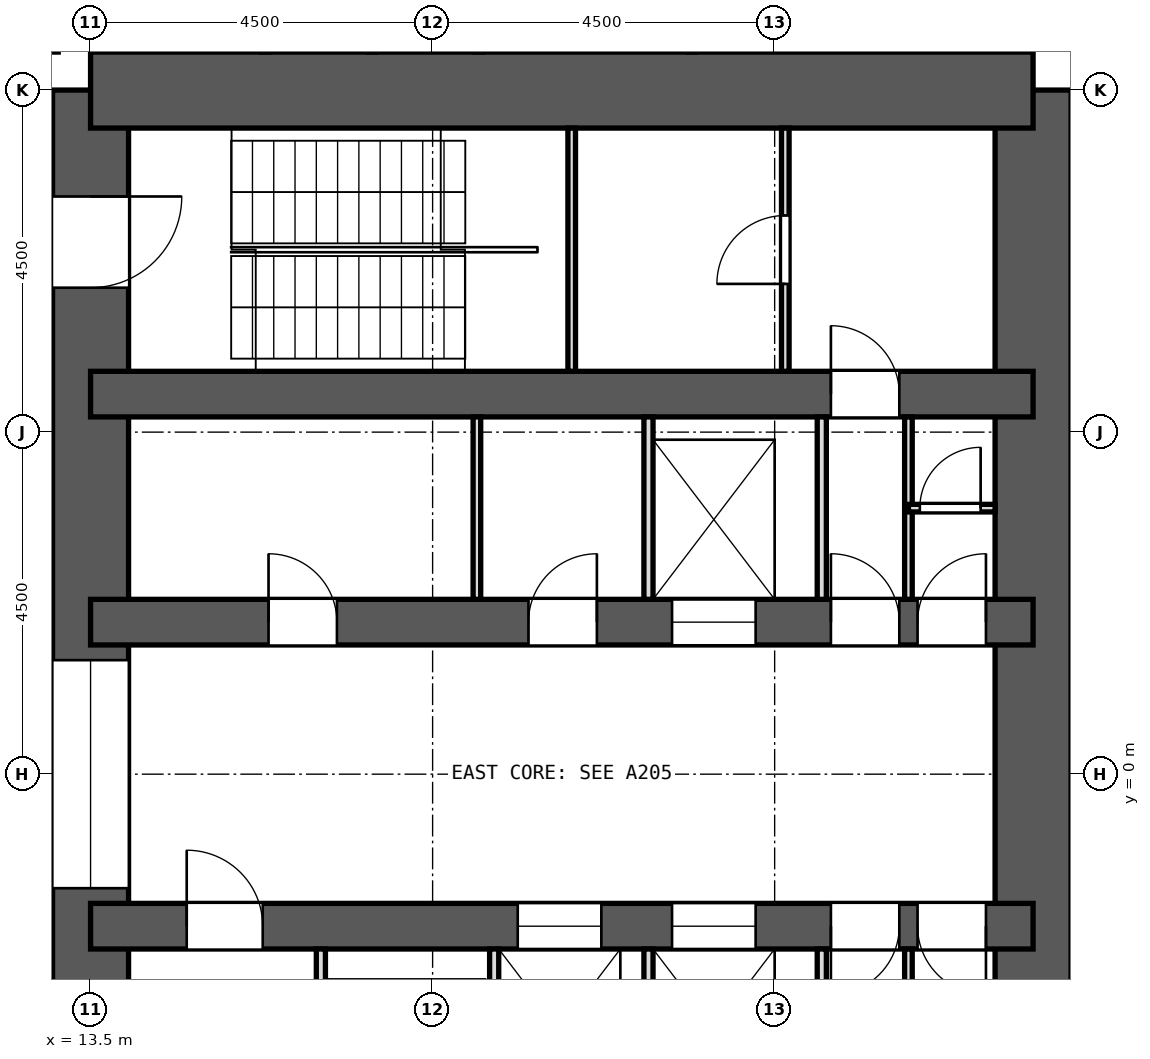
"""IFC4 building model, lengths in metres.
Left out: names, types, materials, properties, quantities, classifications, styles, units other than length and angle.
Written with IfcOpenShell. Run it as: python <this file> out.ifc"""

import sys

from ifc_helpers import new_model, si_unit, direction, frame, frame_2d, origin, place, context, subcontext, project, spatial, rectangle, extrude, element, fill, save


model = new_model("IFC4")
c1 = context("Model", 3, precision=1e-05, world=origin(), true_north=direction((0.0, 1.0)))
c2 = subcontext(c1, "Body", "Model", "MODEL_VIEW")
j1 = project(units=[si_unit("LENGTHUNIT", "METRE"), si_unit("PLANEANGLEUNIT", "RADIAN")], contexts=[c1])
p1 = place(None, origin())
s1 = spatial("IfcSite", under=j1, at=p1, CompositionType="ELEMENT")
p2 = place(p1, origin())
s2 = spatial("IfcBuilding", under=s1, at=p2, CompositionType="ELEMENT")
p3 = place(p2, frame((0.0, 0.0, 9.2)))
s3 = spatial("IfcBuildingStorey", under=s2, at=p3, CompositionType="ELEMENT", Elevation=9.2)
p4 = place(p3, frame((13.5, -9.0, 0.0), z_axis=(0.0, 0.0, 1.0), x_axis=(0.0, 1.0, 0.0)))
e1 = element("IfcWall", 1, at=p4, inside=s3, PredefinedType="SHEAR", context=c2, shape_type="SweptSolid", body=[
    extrude(rectangle(XDim=18.0, YDim=1.0, at=frame_2d((9.0, 0.0))), origin(), (0.0, 0.0, 1.0), 4.2),
])
p5 = place(p4, frame((15.4, 0.0, 0.0)))
e2 = element("IfcOpeningElement", 2, at=p5, cuts=e1, PredefinedType="OPENING", context=c2, shape_type="SweptSolid", body=[
    extrude(rectangle(XDim=1.2, YDim=2.1, at=frame_2d((0.6, 1.05))), frame((0.0, 0.512, 0.0), z_axis=(0.0, -1.0, 0.0), x_axis=(1.0, 0.0, 0.0)), (0.0, 0.0, 1.0), 1.024),
])
p6 = place(p4, frame((1.4, 0.0, 0.0)))
e3 = element("IfcOpeningElement", 3, at=p6, cuts=e1, PredefinedType="OPENING", context=c2, shape_type="SweptSolid", body=[
    extrude(rectangle(XDim=1.2, YDim=2.1, at=frame_2d((0.6, 1.05))), frame((0.0, 0.512, 0.0), z_axis=(0.0, -1.0, 0.0), x_axis=(1.0, 0.0, 0.0)), (0.0, 0.0, 1.0), 1.024),
])
p7 = place(p4, frame((7.5, 0.0, 0.0)))
e4 = element("IfcOpeningElement", 4, at=p7, cuts=e1, PredefinedType="OPENING", context=c2, shape_type="SweptSolid", body=[
    extrude(rectangle(XDim=3.0, YDim=2.4, at=frame_2d((1.5, 1.2))), frame((0.0, 0.512, 0.0), z_axis=(0.0, -1.0, 0.0), x_axis=(1.0, 0.0, 0.0)), (0.0, 0.0, 1.0), 1.024),
])
p8 = place(p3, frame((25.9, -9.0, 0.0), z_axis=(0.0, 0.0, 1.0), x_axis=(0.0, 1.0, 0.0)))
e5 = element("IfcWall", 5, at=p8, inside=s3, PredefinedType="SHEAR", context=c2, shape_type="SweptSolid", body=[
    extrude(rectangle(XDim=18.0, YDim=1.0, at=frame_2d((9.0, 0.0))), origin(), (0.0, 0.0, 1.0), 4.2),
])
p9 = place(p3, frame((13.5, 9.0, 0.0), z_axis=(0.0, 0.0, 1.0), x_axis=(1.0, 0.0, 0.0)))
e6 = element("IfcWall", 6, at=p9, inside=s3, PredefinedType="SHEAR", context=c2, shape_type="SweptSolid", body=[
    extrude(rectangle(XDim=12.4, YDim=1.0, at=frame_2d((6.2, 0.0))), origin(), (0.0, 0.0, 1.0), 4.2),
])
p10 = place(p3, frame((13.5, 5.0, 0.0), z_axis=(0.0, 0.0, 1.0), x_axis=(1.0, 0.0, 0.0)))
e7 = element("IfcWall", 7, at=p10, inside=s3, PredefinedType="SHEAR", context=c2, shape_type="SweptSolid", body=[
    extrude(rectangle(XDim=12.4, YDim=0.6, at=frame_2d((6.2, 0.0))), origin(), (0.0, 0.0, 1.0), 4.2),
])
p11 = place(p10, frame((9.74, 0.0, 0.0)))
e8 = element("IfcOpeningElement", 8, at=p11, cuts=e7, PredefinedType="OPENING", context=c2, shape_type="SweptSolid", body=[
    extrude(rectangle(XDim=0.9, YDim=2.1, at=frame_2d((0.45, 1.05))), frame((0.0, 0.312, 0.0), z_axis=(0.0, -1.0, 0.0), x_axis=(1.0, 0.0, 0.0)), (0.0, 0.0, 1.0), 0.624),
])
p12 = place(p3, frame((13.5, 2.0, 0.0), z_axis=(0.0, 0.0, 1.0), x_axis=(1.0, 0.0, 0.0)))
e9 = element("IfcWall", 9, at=p12, inside=s3, PredefinedType="SHEAR", context=c2, shape_type="SweptSolid", body=[
    extrude(rectangle(XDim=12.4, YDim=0.6, at=frame_2d((6.2, 0.0))), origin(), (0.0, 0.0, 1.0), 4.2),
])
p13 = place(p12, frame((7.65, 0.0, 0.0)))
e10 = element("IfcOpeningElement", 10, at=p13, cuts=e9, PredefinedType="OPENING", context=c2, shape_type="SweptSolid", body=[
    extrude(rectangle(XDim=1.1, YDim=2.1, at=frame_2d((0.55, 1.05))), frame((0.0, 0.312, 0.0), z_axis=(0.0, -1.0, 0.0), x_axis=(1.0, 0.0, 0.0)), (0.0, 0.0, 1.0), 0.624),
])
p14 = place(p12, frame((2.341, 0.0, 0.0)))
e11 = element("IfcOpeningElement", 11, at=p14, cuts=e9, PredefinedType="OPENING", context=c2, shape_type="SweptSolid", body=[
    extrude(rectangle(XDim=0.9, YDim=2.1, at=frame_2d((0.45, 1.05))), frame((0.0, 0.312, 0.0), z_axis=(0.0, -1.0, 0.0), x_axis=(1.0, 0.0, 0.0)), (0.0, 0.0, 1.0), 0.624),
])
p15 = place(p12, frame((5.761, 0.0, 0.0)))
e12 = element("IfcOpeningElement", 12, at=p15, cuts=e9, PredefinedType="OPENING", context=c2, shape_type="SweptSolid", body=[
    extrude(rectangle(XDim=0.9, YDim=2.1, at=frame_2d((0.45, 1.05))), frame((0.0, 0.312, 0.0), z_axis=(0.0, -1.0, 0.0), x_axis=(1.0, 0.0, 0.0)), (0.0, 0.0, 1.0), 0.624),
])
p16 = place(p12, frame((9.74, 0.0, 0.0)))
e13 = element("IfcOpeningElement", 13, at=p16, cuts=e9, PredefinedType="OPENING", context=c2, shape_type="SweptSolid", body=[
    extrude(rectangle(XDim=0.9, YDim=2.1, at=frame_2d((0.45, 1.05))), frame((0.0, 0.312, 0.0), z_axis=(0.0, -1.0, 0.0), x_axis=(1.0, 0.0, 0.0)), (0.0, 0.0, 1.0), 0.624),
])
p17 = place(p12, frame((10.88, 0.0, 0.0)))
e14 = element("IfcOpeningElement", 14, at=p17, cuts=e9, PredefinedType="OPENING", context=c2, shape_type="SweptSolid", body=[
    extrude(rectangle(XDim=0.9, YDim=2.1, at=frame_2d((0.45, 1.05))), frame((0.0, 0.312, 0.0), z_axis=(0.0, -1.0, 0.0), x_axis=(1.0, 0.0, 0.0)), (0.0, 0.0, 1.0), 0.624),
])
p18 = place(p3, frame((13.5, -2.0, 0.0), z_axis=(0.0, 0.0, 1.0), x_axis=(1.0, 0.0, 0.0)))
e15 = element("IfcWall", 15, at=p18, inside=s3, PredefinedType="SHEAR", context=c2, shape_type="SweptSolid", body=[
    extrude(rectangle(XDim=12.4, YDim=0.6, at=frame_2d((6.2, 0.0))), origin(), (0.0, 0.0, 1.0), 4.2),
])
p19 = place(p18, frame((5.62, 0.0, 0.0)))
e16 = element("IfcOpeningElement", 16, at=p19, cuts=e15, PredefinedType="OPENING", context=c2, shape_type="SweptSolid", body=[
    extrude(rectangle(XDim=1.1, YDim=2.1, at=frame_2d((0.55, 1.05))), frame((0.0, 0.312, 0.0), z_axis=(0.0, -1.0, 0.0), x_axis=(1.0, 0.0, 0.0)), (0.0, 0.0, 1.0), 0.624),
])
p20 = place(p18, frame((7.65, 0.0, 0.0)))
e17 = element("IfcOpeningElement", 17, at=p20, cuts=e15, PredefinedType="OPENING", context=c2, shape_type="SweptSolid", body=[
    extrude(rectangle(XDim=1.1, YDim=2.1, at=frame_2d((0.55, 1.05))), frame((0.0, 0.312, 0.0), z_axis=(0.0, -1.0, 0.0), x_axis=(1.0, 0.0, 0.0)), (0.0, 0.0, 1.0), 0.624),
])
p21 = place(p18, frame((1.265, 0.0, 0.0)))
e18 = element("IfcOpeningElement", 18, at=p21, cuts=e15, PredefinedType="OPENING", context=c2, shape_type="SweptSolid", body=[
    extrude(rectangle(XDim=1.0, YDim=2.1, at=frame_2d((0.5, 1.05))), frame((0.0, 0.312, 0.0), z_axis=(0.0, -1.0, 0.0), x_axis=(1.0, 0.0, 0.0)), (0.0, 0.0, 1.0), 0.624),
])
p22 = place(p18, frame((9.74, 0.0, 0.0)))
e19 = element("IfcOpeningElement", 19, at=p22, cuts=e15, PredefinedType="OPENING", context=c2, shape_type="SweptSolid", body=[
    extrude(rectangle(XDim=0.9, YDim=2.1, at=frame_2d((0.45, 1.05))), frame((0.0, 0.312, 0.0), z_axis=(0.0, -1.0, 0.0), x_axis=(1.0, 0.0, 0.0)), (0.0, 0.0, 1.0), 0.624),
])
p23 = place(p18, frame((10.88, 0.0, 0.0)))
e20 = element("IfcOpeningElement", 20, at=p23, cuts=e15, PredefinedType="OPENING", context=c2, shape_type="SweptSolid", body=[
    extrude(rectangle(XDim=0.9, YDim=2.1, at=frame_2d((0.45, 1.05))), frame((0.0, 0.312, 0.0), z_axis=(0.0, -1.0, 0.0), x_axis=(1.0, 0.0, 0.0)), (0.0, 0.0, 1.0), 0.624),
])
p24 = place(p3, frame((27.73, 7.403, 0.0), z_axis=(0.0, 0.0, 1.0), x_axis=(-0.342034744565, 0.939687306241, 0.0)))
e21 = element("IfcWall", 21, at=p24, inside=s3, PredefinedType="SOLIDWALL", context=c2, shape_type="SweptSolid", body=[
    extrude(rectangle(XDim=4.099, YDim=0.6, at=frame_2d((2.05, 0.0))), origin(), (0.0, 0.0, 1.0), 3.65),
])
p25 = place(p3, frame((18.583, 2.3, 0.0), z_axis=(0.0, 0.0, 1.0), x_axis=(0.0, 1.0, 0.0)))
e22 = element("IfcWall", 22, at=p25, inside=s3, PredefinedType="PARTITIONING", context=c2, shape_type="SweptSolid", body=[
    extrude(rectangle(XDim=2.4, YDim=0.1, at=frame_2d((1.2, 0.0))), origin(), (0.0, 0.0, 1.0), 3.65),
])
for number, where, z_axis, x_axis in (
    (23, (20.84, 2.3, 0.0), (0.0, 0.0, 1.0), (0.0, 1.0, 0.0)),
    (24, (23.12, 2.3, 0.0), (0.0, 0.0, 1.0), (0.0, 1.0, 0.0)),
):
    element("IfcWall", number, at=place(p3, frame(where, z_axis=z_axis, x_axis=x_axis)), inside=s3, PredefinedType="PARTITIONING", context=c2, shape_type="SweptSolid", body=[
        extrude(rectangle(XDim=2.4, YDim=0.12, at=frame_2d((1.2, 0.0))), origin(), (0.0, 0.0, 1.0), 3.65),
    ])
p26 = place(p3, frame((24.26, 2.3, 0.0), z_axis=(0.0, 0.0, 1.0), x_axis=(0.0, 1.0, 0.0)))
e25 = element("IfcWall", 25, at=p26, inside=s3, PredefinedType="PARTITIONING", context=c2, shape_type="SweptSolid", body=[
    extrude(rectangle(XDim=2.4, YDim=0.1, at=frame_2d((1.2, 0.0))), origin(), (0.0, 0.0, 1.0), 3.65),
])
p27 = place(p3, frame((16.53, -4.7, 0.0), z_axis=(0.0, 0.0, 1.0), x_axis=(0.0, 1.0, 0.0)))
e26 = element("IfcWall", 26, at=p27, inside=s3, PredefinedType="PARTITIONING", context=c2, shape_type="SweptSolid", body=[
    extrude(rectangle(XDim=2.4, YDim=0.12, at=frame_2d((1.2, 0.0))), origin(), (0.0, 0.0, 1.0), 3.65),
])
p28 = place(p27, frame((0.65, 0.0, 0.0)))
e27 = element("IfcOpeningElement", 27, at=p28, cuts=e26, PredefinedType="OPENING", context=c2, shape_type="SweptSolid", body=[
    extrude(rectangle(XDim=1.1, YDim=2.1, at=frame_2d((0.55, 1.05))), frame((0.0, 0.072, 0.0), z_axis=(0.0, -1.0, 0.0), x_axis=(1.0, 0.0, 0.0)), (0.0, 0.0, 1.0), 0.144),
])
for number, where, z_axis, x_axis in (
    (28, (18.81, -4.7, 0.0), (0.0, 0.0, 1.0), (0.0, 1.0, 0.0)),
    (29, (20.84, -4.7, 0.0), (0.0, 0.0, 1.0), (0.0, 1.0, 0.0)),
    (30, (23.12, -4.7, 0.0), (0.0, 0.0, 1.0), (0.0, 1.0, 0.0)),
):
    element("IfcWall", number, at=place(p3, frame(where, z_axis=z_axis, x_axis=x_axis)), inside=s3, PredefinedType="PARTITIONING", context=c2, shape_type="SweptSolid", body=[
        extrude(rectangle(XDim=2.4, YDim=0.12, at=frame_2d((1.2, 0.0))), origin(), (0.0, 0.0, 1.0), 3.65),
    ])
p29 = place(p3, frame((24.26, -4.7, 0.0), z_axis=(0.0, 0.0, 1.0), x_axis=(0.0, 1.0, 0.0)))
e31 = element("IfcWall", 31, at=p29, inside=s3, PredefinedType="PARTITIONING", context=c2, shape_type="SweptSolid", body=[
    extrude(rectangle(XDim=2.4, YDim=0.1, at=frame_2d((1.2, 0.0))), origin(), (0.0, 0.0, 1.0), 3.65),
])
p30 = place(p3, frame((24.26, 3.5, 0.0), z_axis=(0.0, 0.0, 1.0), x_axis=(1.0, 0.0, 0.0)))
e32 = element("IfcWall", 32, at=p30, inside=s3, PredefinedType="PARTITIONING", context=c2, shape_type="SweptSolid", body=[
    extrude(rectangle(XDim=1.14, YDim=0.1, at=frame_2d((0.57, 0.0))), origin(), (0.0, 0.0, 1.0), 3.65),
])
p31 = place(p30, frame((0.15, 0.0, 0.0)))
e33 = element("IfcOpeningElement", 33, at=p31, cuts=e32, PredefinedType="OPENING", context=c2, shape_type="SweptSolid", body=[
    extrude(rectangle(XDim=0.8, YDim=2.1, at=frame_2d((0.4, 1.05))), frame((0.0, 0.062, 0.0), z_axis=(0.0, -1.0, 0.0), x_axis=(1.0, 0.0, 0.0)), (0.0, 0.0, 1.0), 0.124),
])
p32 = place(p3, frame((19.83, 5.3, 0.0), z_axis=(0.0, 0.0, 1.0), x_axis=(0.0, 1.0, 0.0)))
e34 = element("IfcWall", 34, at=p32, inside=s3, PredefinedType="PARTITIONING", context=c2, shape_type="SweptSolid", body=[
    extrude(rectangle(XDim=3.2, YDim=0.1, at=frame_2d((1.6, 0.0))), origin(), (0.0, 0.0, 1.0), 3.65),
])
p33 = place(p3, frame((22.64, 5.3, 0.0), z_axis=(0.0, 0.0, 1.0), x_axis=(0.0, 1.0, 0.0)))
e35 = element("IfcWall", 35, at=p33, inside=s3, PredefinedType="PARTITIONING", context=c2, shape_type="SweptSolid", body=[
    extrude(rectangle(XDim=3.2, YDim=0.1, at=frame_2d((1.6, 0.0))), origin(), (0.0, 0.0, 1.0), 3.65),
])
p34 = place(p33, frame((1.15, 0.0, 0.0)))
e36 = element("IfcOpeningElement", 36, at=p34, cuts=e35, PredefinedType="OPENING", context=c2, shape_type="SweptSolid", body=[
    extrude(rectangle(XDim=0.9, YDim=2.1, at=frame_2d((0.45, 1.05))), frame((0.0, 0.062, 0.0), z_axis=(0.0, -1.0, 0.0), x_axis=(1.0, 0.0, 0.0)), (0.0, 0.0, 1.0), 0.124),
])
p35 = place(p13, origin())
e37 = element("IfcDoor", 37, at=p35, inside=s3, OperationType="DOUBLE_DOOR_SLIDING", PredefinedType="DOOR", context=c2, shape_type="SweptSolid", body=[
    extrude(rectangle(XDim=1.1, YDim=2.1, at=frame_2d((0.55, 1.05))), frame((0.0, 0.025, 0.0), z_axis=(0.0, -1.0, 0.0), x_axis=(1.0, 0.0, 0.0)), (0.0, 0.0, 1.0), 0.05),
])
fill(e10, e37)
p36 = place(p19, origin())
e38 = element("IfcDoor", 38, at=p36, inside=s3, OperationType="DOUBLE_DOOR_SLIDING", PredefinedType="DOOR", context=c2, shape_type="SweptSolid", body=[
    extrude(rectangle(XDim=1.1, YDim=2.1, at=frame_2d((0.55, 1.05))), frame((0.0, 0.025, 0.0), z_axis=(0.0, -1.0, 0.0), x_axis=(1.0, 0.0, 0.0)), (0.0, 0.0, 1.0), 0.05),
])
fill(e16, e38)
p37 = place(p20, origin())
e39 = element("IfcDoor", 39, at=p37, inside=s3, OperationType="DOUBLE_DOOR_SLIDING", PredefinedType="DOOR", context=c2, shape_type="SweptSolid", body=[
    extrude(rectangle(XDim=1.1, YDim=2.1, at=frame_2d((0.55, 1.05))), frame((0.0, 0.025, 0.0), z_axis=(0.0, -1.0, 0.0), x_axis=(1.0, 0.0, 0.0)), (0.0, 0.0, 1.0), 0.05),
])
fill(e17, e39)
p38 = place(p14, origin())
e40 = element("IfcDoor", 40, at=p38, inside=s3, OperationType="SINGLE_SWING_LEFT", PredefinedType="DOOR", context=c2, shape_type="SweptSolid", body=[
    extrude(rectangle(XDim=0.9, YDim=2.1, at=frame_2d((0.45, 1.05))), frame((0.0, 0.025, 0.0), z_axis=(0.0, -1.0, 0.0), x_axis=(1.0, 0.0, 0.0)), (0.0, 0.0, 1.0), 0.05),
])
fill(e11, e40)
p39 = place(p15, origin())
e41 = element("IfcDoor", 41, at=p39, inside=s3, OperationType="SINGLE_SWING_RIGHT", PredefinedType="DOOR", context=c2, shape_type="SweptSolid", body=[
    extrude(rectangle(XDim=0.9, YDim=2.1, at=frame_2d((0.45, 1.05))), frame((0.0, 0.025, 0.0), z_axis=(0.0, -1.0, 0.0), x_axis=(1.0, 0.0, 0.0)), (0.0, 0.0, 1.0), 0.05),
])
fill(e12, e41)
p40 = place(p16, origin())
e42 = element("IfcDoor", 42, at=p40, inside=s3, OperationType="SINGLE_SWING_LEFT", PredefinedType="DOOR", context=c2, shape_type="SweptSolid", body=[
    extrude(rectangle(XDim=0.9, YDim=2.1, at=frame_2d((0.45, 1.05))), frame((0.0, 0.025, 0.0), z_axis=(0.0, -1.0, 0.0), x_axis=(1.0, 0.0, 0.0)), (0.0, 0.0, 1.0), 0.05),
])
fill(e13, e42)
p41 = place(p17, origin())
e43 = element("IfcDoor", 43, at=p41, inside=s3, OperationType="SINGLE_SWING_RIGHT", PredefinedType="DOOR", context=c2, shape_type="SweptSolid", body=[
    extrude(rectangle(XDim=0.9, YDim=2.1, at=frame_2d((0.45, 1.05))), frame((0.0, 0.025, 0.0), z_axis=(0.0, -1.0, 0.0), x_axis=(1.0, 0.0, 0.0)), (0.0, 0.0, 1.0), 0.05),
])
fill(e14, e43)
p42 = place(p21, origin())
e44 = element("IfcDoor", 44, at=p42, inside=s3, OperationType="SINGLE_SWING_LEFT", PredefinedType="DOOR", context=c2, shape_type="SweptSolid", body=[
    extrude(rectangle(XDim=1.0, YDim=2.1, at=frame_2d((0.5, 1.05))), frame((0.0, 0.025, 0.0), z_axis=(0.0, -1.0, 0.0), x_axis=(1.0, 0.0, 0.0)), (0.0, 0.0, 1.0), 0.05),
])
fill(e18, e44)
p43 = place(p22, frame((0.9, 0.0, 0.0), z_axis=(0.0, 0.0, 1.0), x_axis=(-1.0, 0.0, 0.0)))
e45 = element("IfcDoor", 45, at=p43, inside=s3, OperationType="SINGLE_SWING_RIGHT", PredefinedType="DOOR", context=c2, shape_type="SweptSolid", body=[
    extrude(rectangle(XDim=0.9, YDim=2.1, at=frame_2d((0.45, 1.05))), frame((0.0, 0.025, 0.0), z_axis=(0.0, -1.0, 0.0), x_axis=(1.0, 0.0, 0.0)), (0.0, 0.0, 1.0), 0.05),
])
fill(e19, e45)
p44 = place(p23, frame((0.9, 0.0, 0.0), z_axis=(0.0, 0.0, 1.0), x_axis=(-1.0, 0.0, 0.0)))
e46 = element("IfcDoor", 46, at=p44, inside=s3, OperationType="SINGLE_SWING_LEFT", PredefinedType="DOOR", context=c2, shape_type="SweptSolid", body=[
    extrude(rectangle(XDim=0.9, YDim=2.1, at=frame_2d((0.45, 1.05))), frame((0.0, 0.025, 0.0), z_axis=(0.0, -1.0, 0.0), x_axis=(1.0, 0.0, 0.0)), (0.0, 0.0, 1.0), 0.05),
])
fill(e20, e46)
p45 = place(p31, origin())
e47 = element("IfcDoor", 47, at=p45, inside=s3, OperationType="SINGLE_SWING_RIGHT", PredefinedType="DOOR", context=c2, shape_type="SweptSolid", body=[
    extrude(rectangle(XDim=0.8, YDim=2.1, at=frame_2d((0.4, 1.05))), frame((0.0, 0.025, 0.0), z_axis=(0.0, -1.0, 0.0), x_axis=(1.0, 0.0, 0.0)), (0.0, 0.0, 1.0), 0.05),
])
fill(e33, e47)
p46 = place(p34, origin())
e48 = element("IfcDoor", 48, at=p46, inside=s3, OperationType="SINGLE_SWING_LEFT", PredefinedType="DOOR", context=c2, shape_type="SweptSolid", body=[
    extrude(rectangle(XDim=0.9, YDim=2.1, at=frame_2d((0.45, 1.05))), frame((0.0, 0.025, 0.0), z_axis=(0.0, -1.0, 0.0), x_axis=(1.0, 0.0, 0.0)), (0.0, 0.0, 1.0), 0.05),
])
fill(e36, e48)
p47 = place(p11, origin())
e49 = element("IfcDoor", 49, at=p47, inside=s3, OperationType="SINGLE_SWING_LEFT", PredefinedType="DOOR", context=c2, shape_type="SweptSolid", body=[
    extrude(rectangle(XDim=0.9, YDim=2.1, at=frame_2d((0.45, 1.05))), frame((0.0, 0.025, 0.0), z_axis=(0.0, -1.0, 0.0), x_axis=(1.0, 0.0, 0.0)), (0.0, 0.0, 1.0), 0.05),
])
fill(e8, e49)
p48 = place(p5, frame((1.2, 0.0, 0.0), z_axis=(0.0, 0.0, 1.0), x_axis=(-1.0, 0.0, 0.0)))
e50 = element("IfcDoor", 50, at=p48, inside=s3, OperationType="SINGLE_SWING_LEFT", PredefinedType="DOOR", context=c2, shape_type="SweptSolid", body=[
    extrude(rectangle(XDim=1.2, YDim=2.1, at=frame_2d((0.6, 1.05))), frame((0.0, 0.025, 0.0), z_axis=(0.0, -1.0, 0.0), x_axis=(1.0, 0.0, 0.0)), (0.0, 0.0, 1.0), 0.05),
])
fill(e2, e50)
p49 = place(p7, origin())
e51 = element("IfcDoor", 51, at=p49, inside=s3, OperationType="DOUBLE_DOOR_SLIDING", PredefinedType="DOOR", context=c2, shape_type="SweptSolid", body=[
    extrude(rectangle(XDim=3.0, YDim=2.4, at=frame_2d((1.5, 1.2))), frame((0.0, 0.025, 0.0), z_axis=(0.0, -1.0, 0.0), x_axis=(1.0, 0.0, 0.0)), (0.0, 0.0, 1.0), 0.05),
])
fill(e4, e51)
save(model, sys.argv[1])
